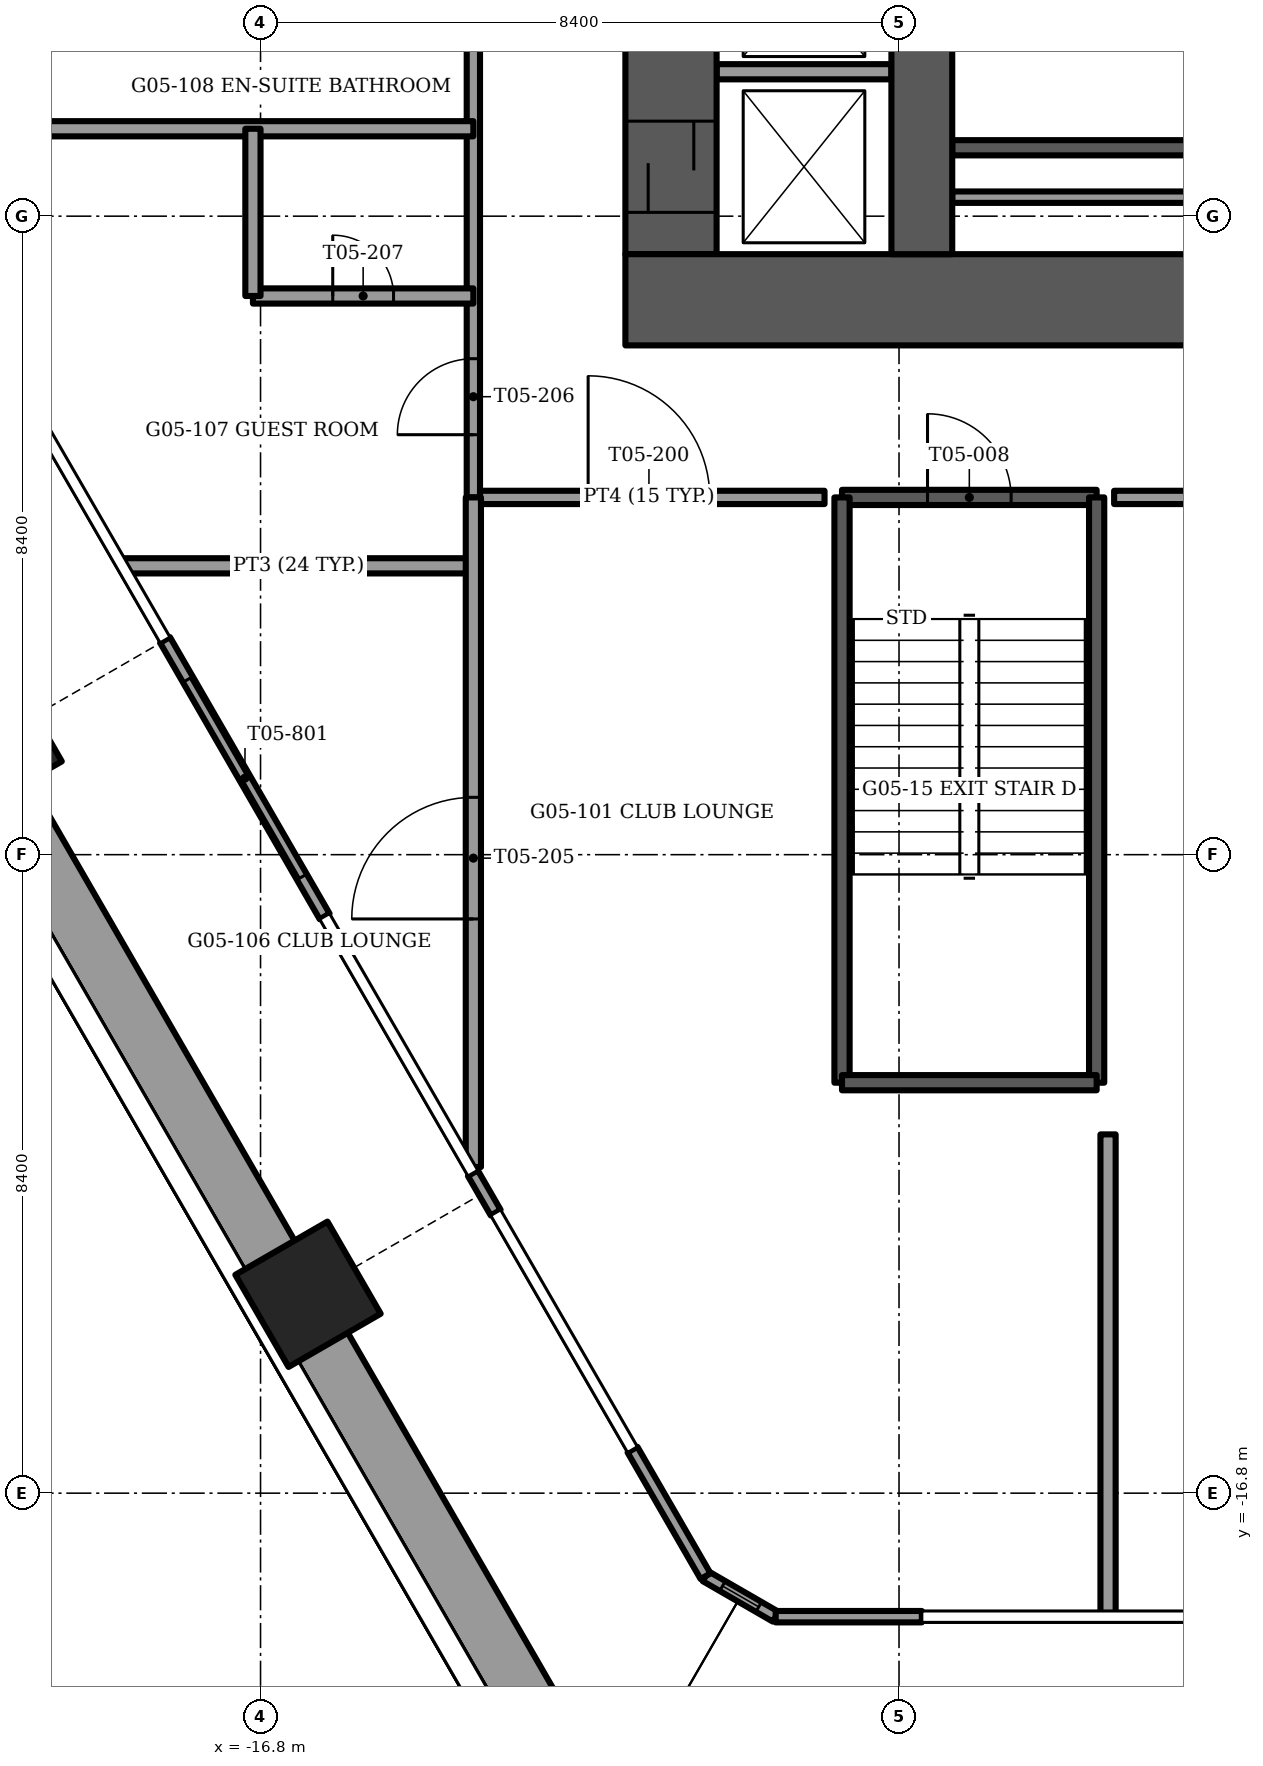
"""IFC4 building model, lengths in metres.
Left out: names, types, materials, properties, quantities, classifications, styles, units other than length and angle.
Written with IfcOpenShell. Run it as: python <this file> out.ifc"""

import sys

from ifc_helpers import new_model, si_unit, direction, frame, frame_2d, origin, origin_2d, place, context, subcontext, project, spatial, rectangle, extrude, element, fill, save


model = new_model("IFC4")
c1 = context("Model", 3, precision=1e-05, world=origin(), true_north=direction((0.0, 1.0)))
c2 = subcontext(c1, "Body", "Model", "MODEL_VIEW")
j1 = project(units=[si_unit("LENGTHUNIT", "METRE"), si_unit("PLANEANGLEUNIT", "RADIAN")], contexts=[c1])
p1 = place(None, origin())
s1 = spatial("IfcSite", under=j1, at=p1, CompositionType="ELEMENT")
p2 = place(p1, origin())
s2 = spatial("IfcBuilding", under=s1, at=p2, CompositionType="ELEMENT")
p3 = place(p2, frame((0.0, 0.0, 23.5)))
s3 = spatial("IfcBuildingStorey", under=s2, at=p3, CompositionType="ELEMENT", Elevation=23.5)
for number, where, z_axis, x_axis in (
    (1, (-20.371, -6.917, -1.2), (0.0, 0.0, 1.0), (-0.5, 0.866, 0.0)),
    (2, (-16.175, -14.183, -1.2), (0.0, 0.0, 1.0), (-0.5, 0.866, 0.0)),
):
    element("IfcColumn", number, at=place(p3, frame(where, z_axis=z_axis, x_axis=x_axis)), inside=s3, PredefinedType="COLUMN", context=c2, shape_type="SweptSolid", body=[
        extrude(rectangle(XDim=1.4, YDim=1.4, at=origin_2d()), origin(), (0.0, 0.0, 1.0), 4.5),
    ])
p4 = place(p3, frame((-12.0, -1.1, -0.3), z_axis=(0.0, 0.0, 1.0), x_axis=(1.0, 0.0, 0.0)))
e3 = element("IfcWall", 3, at=p4, inside=s3, PredefinedType="SHEAR", context=c2, shape_type="SweptSolid", body=[
    extrude(rectangle(XDim=24.0, YDim=1.2, at=frame_2d((12.0, 0.0))), origin(), (0.0, 0.0, 1.0), 4.5),
])
p5 = place(p4, frame((11.2, 0.0, 0.0)))
e4 = element("IfcOpeningElement", 4, at=p5, cuts=e3, PredefinedType="OPENING", context=c2, shape_type="SweptSolid", body=[
    extrude(rectangle(XDim=1.6, YDim=2.1, at=frame_2d((0.8, 1.05))), frame((0.0, 0.6, 0.0), z_axis=(0.0, -1.0, 0.0), x_axis=(1.0, 0.0, 0.0)), (0.0, 0.0, 1.0), 1.2),
])
p6 = place(p3, frame((-8.1, -0.5, -0.3), z_axis=(0.0, 0.0, 1.0), x_axis=(0.0, 1.0, 0.0)))
e5 = element("IfcWall", 5, at=p6, inside=s3, PredefinedType="SHEAR", context=c2, shape_type="SweptSolid", body=[
    extrude(rectangle(XDim=9.0, YDim=0.8, at=frame_2d((4.5, 0.0))), origin(), (0.0, 0.0, 1.0), 4.5),
])
p7 = place(p6, frame((7.75, 0.0, 0.0)))
e6 = element("IfcOpeningElement", 6, at=p7, cuts=e5, PredefinedType="OPENING", context=c2, shape_type="SweptSolid", body=[
    extrude(rectangle(XDim=1.1, YDim=2.1, at=frame_2d((0.55, 1.05))), frame((0.0, 0.4, 0.0), z_axis=(0.0, -1.0, 0.0), x_axis=(1.0, 0.0, 0.0)), (0.0, 0.0, 1.0), 0.8),
])
p8 = place(p3, frame((-11.4, -0.5, -0.3), z_axis=(0.0, 0.0, 1.0), x_axis=(0.0, 1.0, 0.0)))
e7 = element("IfcWall", 7, at=p8, inside=s3, PredefinedType="SHEAR", context=c2, shape_type="SweptSolid", body=[
    extrude(rectangle(XDim=9.0, YDim=1.2, at=frame_2d((4.5, 0.0))), origin(), (0.0, 0.0, 1.0), 4.5),
])
p9 = place(p8, frame((7.75, 0.0, 0.0)))
e8 = element("IfcOpeningElement", 8, at=p9, cuts=e7, PredefinedType="OPENING", context=c2, shape_type="SweptSolid", body=[
    extrude(rectangle(XDim=1.1, YDim=2.1, at=frame_2d((0.55, 1.05))), frame((0.0, 0.6, 0.0), z_axis=(0.0, -1.0, 0.0), x_axis=(1.0, 0.0, 0.0)), (0.0, 0.0, 1.0), 1.2),
])
p10 = place(p8, frame((0.55, 0.0, 0.0)))
e9 = element("IfcOpeningElement", 9, at=p10, cuts=e7, PredefinedType="OPENING", context=c2, shape_type="SweptSolid", body=[
    extrude(rectangle(XDim=1.2, YDim=2.1, at=frame_2d((0.6, 1.05))), frame((0.0, 0.6, 0.0), z_axis=(0.0, -1.0, 0.0), x_axis=(1.0, 0.0, 0.0)), (0.0, 0.0, 1.0), 1.2),
])
p11 = place(p8, frame((3.0, 0.0, 0.0)))
e10 = element("IfcOpeningElement", 10, at=p11, cuts=e7, PredefinedType="OPENING", context=c2, shape_type="SweptSolid", body=[
    extrude(rectangle(XDim=1.2, YDim=2.1, at=frame_2d((0.6, 1.05))), frame((0.0, 0.6, 0.0), z_axis=(0.0, -1.0, 0.0), x_axis=(1.0, 0.0, 0.0)), (0.0, 0.0, 1.0), 1.2),
])
p12 = place(p3, frame((-20.252, -7.622, 0.0), z_axis=(0.0, 0.0, 1.0), x_axis=(0.499997206141, -0.866027016814, 0.0)))
e11 = element("IfcWall", 11, at=p12, inside=s3, PredefinedType="PARAPET", context=c2, shape_type="SweptSolid", body=[
    extrude(rectangle(XDim=7.051, YDim=0.9, at=frame_2d((3.525, 0.0))), origin(), (0.0, 0.0, 1.0), 1.1),
])
p13 = place(p3, frame((-16.057, -14.889, 0.0), z_axis=(0.0, 0.0, 1.0), x_axis=(0.500005133765, -0.866022439784, 0.0)))
e12 = element("IfcWall", 12, at=p13, inside=s3, PredefinedType="PARAPET", context=c2, shape_type="SweptSolid", body=[
    extrude(rectangle(XDim=6.704, YDim=0.9, at=frame_2d((3.352, 0.0))), origin(), (0.0, 0.0, 1.0), 1.1),
])
p14 = place(p3, frame((-18.957, 4.016, 0.0), z_axis=(0.0, 0.0, 1.0), x_axis=(-0.500009633848, -0.866019841608, 0.0)))
e13 = element("IfcWall", 13, at=p14, inside=s3, PredefinedType="SOLIDWALL", context=c2, shape_type="SweptSolid", body=[
    extrude(rectangle(XDim=4.023, YDim=0.15, at=frame_2d((2.011, 0.0))), origin(), (0.0, 0.0, 1.0), 4.2),
])
p15 = place(p3, frame((-18.056, -5.575, 0.0), z_axis=(0.0, 0.0, 1.0), x_axis=(0.49998411664, -0.866034573852, 0.0)))
e14 = element("IfcWall", 14, at=p15, inside=s3, PredefinedType="SOLIDWALL", context=c2, shape_type="SweptSolid", body=[
    extrude(rectangle(XDim=4.2, YDim=0.15, at=frame_2d((2.1, 0.0))), origin(), (0.0, 0.0, 1.0), 4.2),
])
p16 = place(p15, frame((0.6, 0.0, 0.0)))
e15 = element("IfcOpeningElement", 15, at=p16, cuts=e14, PredefinedType="OPENING", context=c2, shape_type="SweptSolid", body=[
    extrude(rectangle(XDim=3.0, YDim=2.4, at=frame_2d((1.5, 1.2))), frame((0.0, 0.075, 0.0), z_axis=(0.0, -1.0, 0.0), x_axis=(1.0, 0.0, 0.0)), (0.0, 0.0, 1.0), 0.15),
])
p17 = place(p3, frame((-11.906, -16.227, 0.0), z_axis=(0.0, 0.0, 1.0), x_axis=(0.499989888488, -0.86603124159, 0.0)))
e16 = element("IfcWall", 16, at=p17, inside=s3, PredefinedType="SOLIDWALL", context=c2, shape_type="SweptSolid", body=[
    extrude(rectangle(XDim=1.923, YDim=0.15, at=frame_2d((0.961, 0.0))), origin(), (0.0, 0.0, 1.0), 4.2),
])
p18 = place(p3, frame((-14.007, -12.59, 0.0), z_axis=(0.0, 0.0, 1.0), x_axis=(0.50012165622, -0.865955154139, 0.0)))
e17 = element("IfcWall", 17, at=p18, inside=s3, PredefinedType="SOLIDWALL", context=c2, shape_type="SweptSolid", body=[
    extrude(rectangle(XDim=0.6, YDim=0.15, at=frame_2d((0.3, 0.0))), origin(), (0.0, 0.0, 1.0), 4.2),
])
p19 = place(p3, frame((-10.023, -18.425, 0.0), z_axis=(0.0, 0.0, 1.0), x_axis=(1.0, 0.0, 0.0)))
e18 = element("IfcWall", 18, at=p19, inside=s3, PredefinedType="SOLIDWALL", context=c2, shape_type="SweptSolid", body=[
    extrude(rectangle(XDim=1.923, YDim=0.15, at=frame_2d((0.961, 0.0))), origin(), (0.0, 0.0, 1.0), 4.2),
])
p20 = place(p3, frame((-10.945, -17.893, 0.0), z_axis=(0.0, 0.0, 1.0), x_axis=(0.866048165231, -0.499960573946, 0.0)))
e19 = element("IfcWall", 19, at=p20, inside=s3, PredefinedType="SOLIDWALL", context=c2, shape_type="SweptSolid", body=[
    extrude(rectangle(XDim=1.065, YDim=0.15, at=frame_2d((0.532, 0.0))), origin(), (0.0, 0.0, 1.0), 4.2),
])
p21 = place(p20, frame((0.258, 0.0, 0.15)))
e20 = element("IfcOpeningElement", 20, at=p21, cuts=e19, PredefinedType="OPENING", context=c2, shape_type="SweptSolid", body=[
    extrude(rectangle(XDim=0.55, YDim=3.6, at=frame_2d((0.275, 1.8))), frame((0.0, 0.075, 0.0), z_axis=(0.0, -1.0, 0.0), x_axis=(1.0, 0.0, 0.0)), (0.0, 0.0, 1.0), 0.15),
])
p22 = place(p3, frame((-7.7, 0.9, -0.3), z_axis=(0.0, 0.0, 1.0), x_axis=(1.0, 0.0, 0.0)))
e21 = element("IfcWall", 21, at=p22, inside=s3, PredefinedType="SOLIDWALL", context=c2, shape_type="SweptSolid", body=[
    extrude(rectangle(XDim=3.25, YDim=0.2, at=frame_2d((1.625, 0.0))), origin(), (0.0, 0.0, 1.0), 4.5),
])
p23 = place(p3, frame((-7.7, 0.25, 0.0), z_axis=(0.0, 0.0, 1.0), x_axis=(1.0, 0.0, 0.0)))
e22 = element("IfcWall", 22, at=p23, inside=s3, PredefinedType="PARTITIONING", context=c2, shape_type="SweptSolid", body=[
    extrude(rectangle(XDim=3.9, YDim=0.15, at=frame_2d((1.95, 0.0))), origin(), (0.0, 0.0, 1.0), 4.2),
])
p24 = place(p3, frame((-9.15, -3.7, -0.3), z_axis=(0.0, 0.0, 1.0), x_axis=(1.0, 0.0, 0.0)))
e23 = element("IfcWall", 23, at=p24, inside=s3, PredefinedType="SOLIDWALL", context=c2, shape_type="SweptSolid", body=[
    extrude(rectangle(XDim=3.35, YDim=0.2, at=frame_2d((1.675, 0.0))), origin(), (0.0, 0.0, 1.0), 4.5),
])
p25 = place(p24, frame((1.125, 0.0, 0.0)))
e24 = element("IfcOpeningElement", 24, at=p25, cuts=e23, PredefinedType="OPENING", context=c2, shape_type="SweptSolid", body=[
    extrude(rectangle(XDim=1.1, YDim=2.1, at=frame_2d((0.55, 1.05))), frame((0.0, 0.1, 0.0), z_axis=(0.0, -1.0, 0.0), x_axis=(1.0, 0.0, 0.0)), (0.0, 0.0, 1.0), 0.2),
])
for number, where, z_axis, x_axis in (
    (25, (-9.15, -3.7, -0.3), (0.0, 0.0, 1.0), (0.0, -1.0, 0.0)),
    (26, (-5.8, -3.7, -0.3), (0.0, 0.0, 1.0), (0.0, -1.0, 0.0)),
):
    element("IfcWall", number, at=place(p3, frame(where, z_axis=z_axis, x_axis=x_axis)), inside=s3, PredefinedType="SOLIDWALL", context=c2, shape_type="SweptSolid", body=[
        extrude(rectangle(XDim=7.7, YDim=0.2, at=frame_2d((3.85, 0.0))), origin(), (0.0, 0.0, 1.0), 4.5),
    ])
p26 = place(p3, frame((-9.15, -11.4, -0.3), z_axis=(0.0, 0.0, 1.0), x_axis=(1.0, 0.0, 0.0)))
e27 = element("IfcWall", 27, at=p26, inside=s3, PredefinedType="SOLIDWALL", context=c2, shape_type="SweptSolid", body=[
    extrude(rectangle(XDim=3.35, YDim=0.2, at=frame_2d((1.675, 0.0))), origin(), (0.0, 0.0, 1.0), 4.5),
])
p27 = place(p3, frame((-10.8, 1.9, 0.0), z_axis=(0.0, 0.0, 1.0), x_axis=(1.0, 0.0, 0.0)))
e28 = element("IfcWall", 28, at=p27, inside=s3, PredefinedType="PARTITIONING", context=c2, shape_type="SweptSolid", body=[
    extrude(rectangle(XDim=2.3, YDim=0.2, at=frame_2d((1.15, 0.0))), origin(), (0.0, 0.0, 1.0), 4.2),
])
p28 = place(p3, frame((-14.0, -3.7, 0.0), z_axis=(0.0, 0.0, 1.0), x_axis=(1.0, 0.0, 0.0)))
e29 = element("IfcWall", 29, at=p28, inside=s3, PredefinedType="PARTITIONING", context=c2, shape_type="SweptSolid", body=[
    extrude(rectangle(XDim=4.62, YDim=0.175, at=frame_2d((2.31, 0.0))), origin(), (0.0, 0.0, 1.0), 4.2),
])
p29 = place(p28, frame((1.51, 0.0, 0.0)))
e30 = element("IfcOpeningElement", 30, at=p29, cuts=e29, PredefinedType="OPENING", context=c2, shape_type="SweptSolid", body=[
    extrude(rectangle(XDim=1.6, YDim=2.1, at=frame_2d((0.8, 1.05))), frame((0.0, 0.087, 0.0), z_axis=(0.0, -1.0, 0.0), x_axis=(1.0, 0.0, 0.0)), (0.0, 0.0, 1.0), 0.175),
])
p30 = place(p3, frame((-5.57, -3.7, 0.0), z_axis=(0.0, 0.0, 1.0), x_axis=(1.0, 0.0, 0.0)))
e31 = element("IfcWall", 31, at=p30, inside=s3, PredefinedType="PARTITIONING", context=c2, shape_type="SweptSolid", body=[
    extrude(rectangle(XDim=11.14, YDim=0.175, at=frame_2d((5.57, 0.0))), origin(), (0.0, 0.0, 1.0), 4.2),
])
p31 = place(p30, frame((2.185, 0.0, 0.0)))
e32 = element("IfcOpeningElement", 32, at=p31, cuts=e31, PredefinedType="OPENING", context=c2, shape_type="SweptSolid", body=[
    extrude(rectangle(XDim=1.6, YDim=2.1, at=frame_2d((0.8, 1.05))), frame((0.0, 0.087, 0.0), z_axis=(0.0, -1.0, 0.0), x_axis=(1.0, 0.0, 0.0)), (0.0, 0.0, 1.0), 0.175),
])
p32 = place(p30, frame((7.755, 0.0, 0.0)))
e33 = element("IfcOpeningElement", 33, at=p32, cuts=e31, PredefinedType="OPENING", context=c2, shape_type="SweptSolid", body=[
    extrude(rectangle(XDim=1.6, YDim=2.1, at=frame_2d((0.8, 1.05))), frame((0.0, 0.087, 0.0), z_axis=(0.0, -1.0, 0.0), x_axis=(1.0, 0.0, 0.0)), (0.0, 0.0, 1.0), 0.175),
])
p33 = place(p3, frame((-14.0, -3.7, 0.0), z_axis=(0.0, 0.0, 1.0), x_axis=(0.0, 1.0, 0.0)))
e34 = element("IfcWall", 34, at=p33, inside=s3, PredefinedType="PARTITIONING", context=c2, shape_type="SweptSolid", body=[
    extrude(rectangle(XDim=15.4, YDim=0.175, at=frame_2d((7.7, 0.0))), origin(), (0.0, 0.0, 1.0), 4.2),
])
p34 = place(p33, frame((0.825, 0.0, 0.0)))
e35 = element("IfcOpeningElement", 35, at=p34, cuts=e34, PredefinedType="OPENING", context=c2, shape_type="SweptSolid", body=[
    extrude(rectangle(XDim=1.0, YDim=2.1, at=frame_2d((0.5, 1.05))), frame((0.0, 0.087, 0.0), z_axis=(0.0, -1.0, 0.0), x_axis=(1.0, 0.0, 0.0)), (0.0, 0.0, 1.0), 0.175),
])
p35 = place(p33, frame((6.125, 0.0, 0.0)))
e36 = element("IfcOpeningElement", 36, at=p35, cuts=e34, PredefinedType="OPENING", context=c2, shape_type="SweptSolid", body=[
    extrude(rectangle(XDim=1.0, YDim=2.1, at=frame_2d((0.5, 1.05))), frame((0.0, 0.087, 0.0), z_axis=(0.0, -1.0, 0.0), x_axis=(1.0, 0.0, 0.0)), (0.0, 0.0, 1.0), 0.175),
])
p36 = place(p33, frame((12.5, 0.0, 0.0)))
e37 = element("IfcOpeningElement", 37, at=p36, cuts=e34, PredefinedType="OPENING", context=c2, shape_type="SweptSolid", body=[
    extrude(rectangle(XDim=1.0, YDim=2.1, at=frame_2d((0.5, 1.05))), frame((0.0, 0.087, 0.0), z_axis=(0.0, -1.0, 0.0), x_axis=(1.0, 0.0, 0.0)), (0.0, 0.0, 1.0), 0.175),
])
p37 = place(p3, frame((-18.598, -4.6, 0.0), z_axis=(0.0, 0.0, 1.0), x_axis=(1.0, 0.0, 0.0)))
e38 = element("IfcWall", 38, at=p37, inside=s3, PredefinedType="PARTITIONING", context=c2, shape_type="SweptSolid", body=[
    extrude(rectangle(XDim=4.598, YDim=0.2, at=frame_2d((2.299, 0.0))), origin(), (0.0, 0.0, 1.0), 4.2),
])
p38 = place(p3, frame((-16.9, -1.05, 0.0), z_axis=(0.0, 0.0, 1.0), x_axis=(1.0, 0.0, 0.0)))
e39 = element("IfcWall", 39, at=p38, inside=s3, PredefinedType="PARTITIONING", context=c2, shape_type="SweptSolid", body=[
    extrude(rectangle(XDim=2.9, YDim=0.2, at=frame_2d((1.45, 0.0))), origin(), (0.0, 0.0, 1.0), 4.2),
])
p39 = place(p38, frame((1.05, 0.0, 0.0)))
e40 = element("IfcOpeningElement", 40, at=p39, cuts=e39, PredefinedType="OPENING", context=c2, shape_type="SweptSolid", body=[
    extrude(rectangle(XDim=0.8, YDim=2.1, at=frame_2d((0.4, 1.05))), frame((0.0, 0.1, 0.0), z_axis=(0.0, -1.0, 0.0), x_axis=(1.0, 0.0, 0.0)), (0.0, 0.0, 1.0), 0.2),
])
p40 = place(p3, frame((-20.52, 1.15, 0.0), z_axis=(0.0, 0.0, 1.0), x_axis=(1.0, 0.0, 0.0)))
e41 = element("IfcWall", 41, at=p40, inside=s3, PredefinedType="PARTITIONING", context=c2, shape_type="SweptSolid", body=[
    extrude(rectangle(XDim=6.52, YDim=0.2, at=frame_2d((3.26, 0.0))), origin(), (0.0, 0.0, 1.0), 4.2),
])
p41 = place(p3, frame((-16.9, -1.05, 0.0), z_axis=(0.0, 0.0, 1.0), x_axis=(0.0, 1.0, 0.0)))
e42 = element("IfcWall", 42, at=p41, inside=s3, PredefinedType="PARTITIONING", context=c2, shape_type="SweptSolid", body=[
    extrude(rectangle(XDim=2.2, YDim=0.2, at=frame_2d((1.1, 0.0))), origin(), (0.0, 0.0, 1.0), 4.2),
])
p42 = place(p3, frame((-14.0, -12.509, 0.0), z_axis=(0.0, 0.0, 1.0), x_axis=(0.0, 1.0, 0.0)))
e43 = element("IfcWall", 43, at=p42, inside=s3, PredefinedType="PARTITIONING", context=c2, shape_type="SweptSolid", body=[
    extrude(rectangle(XDim=8.809, YDim=0.2, at=frame_2d((4.405, 0.0))), origin(), (0.0, 0.0, 1.0), 4.2),
])
p43 = place(p42, frame((3.263, 0.0, 0.0)))
e44 = element("IfcOpeningElement", 44, at=p43, cuts=e43, PredefinedType="OPENING", context=c2, shape_type="SweptSolid", body=[
    extrude(rectangle(XDim=1.6, YDim=2.1, at=frame_2d((0.8, 1.05))), frame((0.0, 0.1, 0.0), z_axis=(0.0, -1.0, 0.0), x_axis=(1.0, 0.0, 0.0)), (0.0, 0.0, 1.0), 0.2),
])
p44 = place(p3, frame((-5.65, -18.406, 0.0), z_axis=(0.0, 0.0, 1.0), x_axis=(0.0, 1.0, 0.0)))
e45 = element("IfcWall", 45, at=p44, inside=s3, PredefinedType="PARTITIONING", context=c2, shape_type="SweptSolid", body=[
    extrude(rectangle(XDim=6.326, YDim=0.2, at=frame_2d((3.163, 0.0))), origin(), (0.0, 0.0, 1.0), 4.2),
])
p45 = place(p16, origin())
e46 = element("IfcDoor", 46, at=p45, inside=s3, OperationType="SLIDING_TO_RIGHT", PredefinedType="DOOR", context=c2, shape_type="SweptSolid", body=[
    extrude(rectangle(XDim=3.0, YDim=2.4, at=frame_2d((1.5, 1.2))), frame((0.0, 0.025, 0.0), z_axis=(0.0, -1.0, 0.0), x_axis=(1.0, 0.0, 0.0)), (0.0, 0.0, 1.0), 0.05),
])
fill(e15, e46)
p46 = place(p21, origin())
e47 = element("IfcWindow", 47, at=p46, inside=s3, PartitioningType="SINGLE_PANEL", PredefinedType="WINDOW", context=c2, shape_type="SweptSolid", body=[
    extrude(rectangle(XDim=0.55, YDim=3.6, at=frame_2d((0.275, 1.8))), frame((0.0, 0.03, 0.0), z_axis=(0.0, -1.0, 0.0), x_axis=(1.0, 0.0, 0.0)), (0.0, 0.0, 1.0), 0.06),
])
fill(e20, e47)
p47 = place(p25, origin())
e48 = element("IfcDoor", 48, at=p47, inside=s3, OperationType="SINGLE_SWING_LEFT", PredefinedType="DOOR", context=c2, shape_type="SweptSolid", body=[
    extrude(rectangle(XDim=1.1, YDim=2.1, at=frame_2d((0.55, 1.05))), frame((0.0, 0.025, 0.0), z_axis=(0.0, -1.0, 0.0), x_axis=(1.0, 0.0, 0.0)), (0.0, 0.0, 1.0), 0.05),
])
fill(e24, e48)
p48 = place(p10, origin())
e49 = element("IfcDoor", 49, at=p48, inside=s3, OperationType="SLIDING_TO_LEFT", PredefinedType="DOOR", context=c2, shape_type="SweptSolid", body=[
    extrude(rectangle(XDim=1.2, YDim=2.1, at=frame_2d((0.6, 1.05))), frame((0.0, 0.025, 0.0), z_axis=(0.0, -1.0, 0.0), x_axis=(1.0, 0.0, 0.0)), (0.0, 0.0, 1.0), 0.05),
])
fill(e9, e49)
p49 = place(p29, origin())
e50 = element("IfcDoor", 50, at=p49, inside=s3, OperationType="DOUBLE_DOOR_SINGLE_SWING", PredefinedType="DOOR", context=c2, shape_type="SweptSolid", body=[
    extrude(rectangle(XDim=1.6, YDim=2.1, at=frame_2d((0.8, 1.05))), frame((0.0, 0.025, 0.0), z_axis=(0.0, -1.0, 0.0), x_axis=(1.0, 0.0, 0.0)), (0.0, 0.0, 1.0), 0.05),
])
fill(e30, e50)
p50 = place(p43, origin())
e51 = element("IfcDoor", 51, at=p50, inside=s3, OperationType="DOUBLE_DOOR_SINGLE_SWING", PredefinedType="DOOR", context=c2, shape_type="SweptSolid", body=[
    extrude(rectangle(XDim=1.6, YDim=2.1, at=frame_2d((0.8, 1.05))), frame((0.0, 0.025, 0.0), z_axis=(0.0, -1.0, 0.0), x_axis=(1.0, 0.0, 0.0)), (0.0, 0.0, 1.0), 0.05),
])
fill(e44, e51)
p51 = place(p34, origin())
e52 = element("IfcDoor", 52, at=p51, inside=s3, OperationType="SINGLE_SWING_RIGHT", PredefinedType="DOOR", context=c2, shape_type="SweptSolid", body=[
    extrude(rectangle(XDim=1.0, YDim=2.1, at=frame_2d((0.5, 1.05))), frame((0.0, 0.025, 0.0), z_axis=(0.0, -1.0, 0.0), x_axis=(1.0, 0.0, 0.0)), (0.0, 0.0, 1.0), 0.05),
])
fill(e35, e52)
p52 = place(p39, origin())
e53 = element("IfcDoor", 53, at=p52, inside=s3, OperationType="SINGLE_SWING_LEFT", PredefinedType="DOOR", context=c2, shape_type="SweptSolid", body=[
    extrude(rectangle(XDim=0.8, YDim=2.1, at=frame_2d((0.4, 1.05))), frame((0.0, 0.025, 0.0), z_axis=(0.0, -1.0, 0.0), x_axis=(1.0, 0.0, 0.0)), (0.0, 0.0, 1.0), 0.05),
])
fill(e40, e53)
save(model, sys.argv[1])
